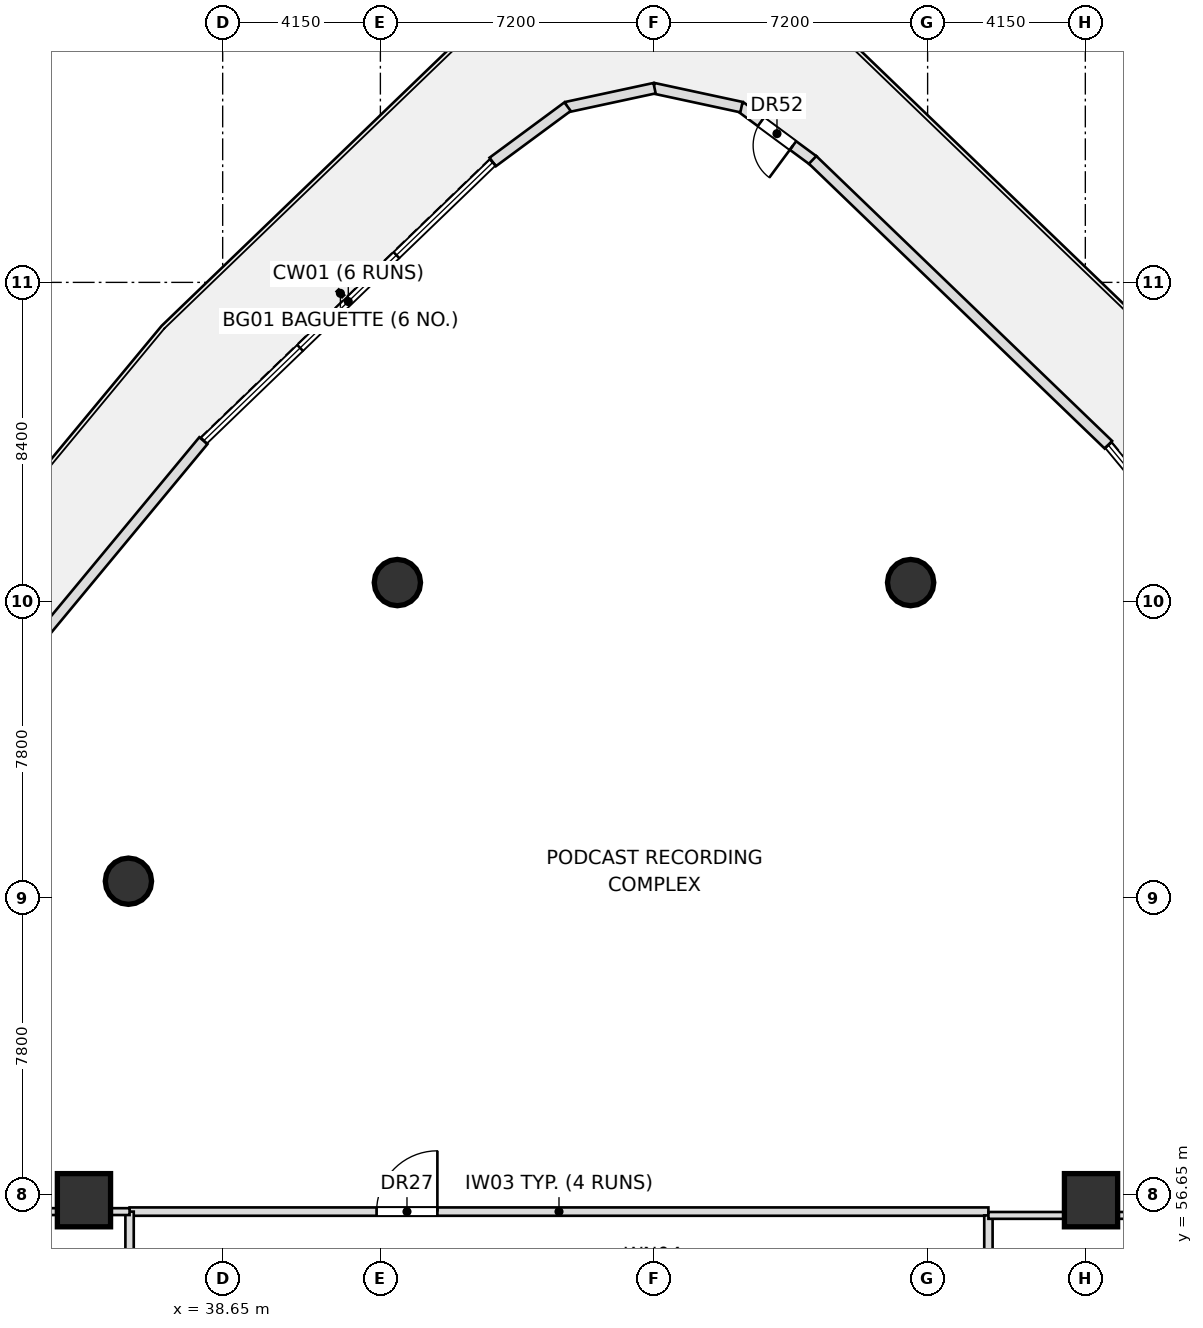
"""IFC4 building model, lengths in metres.
Left out: names, types, materials, properties, quantities, classifications, styles, units other than length and angle.
Written with IfcOpenShell. Run it as: python <this file> out.ifc"""

import sys

from ifc_helpers import new_model, si_unit, direction, frame, frame_2d, origin, origin_2d, place, context, subcontext, project, spatial, rectangle, hollow_circle, extrude, element, fill, save


model = new_model("IFC4")
c1 = context("Model", 3, precision=1e-05, world=origin(), true_north=direction((0.0, 1.0)))
c2 = subcontext(c1, "Body", "Model", "MODEL_VIEW")
j1 = project(units=[si_unit("LENGTHUNIT", "METRE"), si_unit("PLANEANGLEUNIT", "RADIAN")], contexts=[c1])
p1 = place(None, origin())
s1 = spatial("IfcSite", under=j1, at=p1, CompositionType="ELEMENT")
p2 = place(p1, origin())
s2 = spatial("IfcBuilding", under=s1, at=p2, CompositionType="ELEMENT")
p3 = place(p2, frame((0.0, 0.0, 11.4)))
s3 = spatial("IfcBuildingStorey", under=s2, at=p3, CompositionType="ELEMENT", Elevation=11.4)
for number, where, z_axis, x_axis in (
    (1, (61.5, 56.5, 0.0), (0.0, 0.0, 1.0), (1.0, 0.0, 0.0)),
    (2, (35.0, 56.5, 0.0), (0.0, 0.0, 1.0), (1.0, 0.0, 0.0)),
):
    element("IfcColumn", number, at=place(p3, frame(where, z_axis=z_axis, x_axis=x_axis)), inside=s3, PredefinedType="COLUMN", context=c2, shape_type="SweptSolid", body=[
        extrude(rectangle(XDim=1.4, YDim=1.4, at=origin_2d()), origin(), (0.0, 0.0, 1.0), 5.05),
    ])
for number, where, z_axis, x_axis in (
    (3, (43.247, 72.751, 0.0), (0.0, 0.0, 1.0), (1.0, 0.0, 0.0)),
    (4, (36.17, 64.893, 0.0), (0.0, 0.0, 1.0), (1.0, 0.0, 0.0)),
    (5, (56.753, 72.751, 0.0), (0.0, 0.0, 1.0), (1.0, 0.0, 0.0)),
):
    element("IfcColumn", number, at=place(p3, frame(where, z_axis=z_axis, x_axis=x_axis)), inside=s3, PredefinedType="COLUMN", context=c2, shape_type="SweptSolid", body=[
        extrude(hollow_circle(Radius=0.61, WallThickness=0.05, at=origin_2d()), origin(), (0.0, 0.0, 1.0), 5.05),
    ])
p4 = place(p3, frame((36.2, 56.2, 0.0), z_axis=(0.0, 0.0, 1.0), x_axis=(1.0, 0.0, 0.0)))
e6 = element("IfcWall", 6, at=p4, inside=s3, PredefinedType="PARTITIONING", context=c2, shape_type="SweptSolid", body=[
    extrude(rectangle(XDim=22.6, YDim=0.22, at=frame_2d((11.3, 0.0))), origin(), (0.0, 0.0, 1.0), 5.05),
])
p5 = place(p4, frame((6.5, 0.0, 0.0)))
e7 = element("IfcOpeningElement", 7, at=p5, cuts=e6, PredefinedType="OPENING", context=c2, shape_type="SweptSolid", body=[
    extrude(rectangle(XDim=1.6, YDim=2.3, at=frame_2d((0.8, 1.15))), frame((0.0, 0.12, 0.0), z_axis=(0.0, -1.0, 0.0), x_axis=(1.0, 0.0, 0.0)), (0.0, 0.0, 1.0), 0.24),
])
p6 = place(p3, frame((36.2, 38.1, 0.0), z_axis=(0.0, 0.0, 1.0), x_axis=(0.0, 1.0, 0.0)))
e8 = element("IfcWall", 8, at=p6, inside=s3, PredefinedType="PARTITIONING", context=c2, shape_type="SweptSolid", body=[
    extrude(rectangle(XDim=18.1, YDim=0.22, at=frame_2d((9.05, 0.0))), origin(), (0.0, 0.0, 1.0), 4.125),
])
p7 = place(p6, frame((5.5, 0.0, 0.0)))
e9 = element("IfcOpeningElement", 9, at=p7, cuts=e8, PredefinedType="OPENING", context=c2, shape_type="SweptSolid", body=[
    extrude(rectangle(XDim=1.6, YDim=2.3, at=frame_2d((0.8, 1.15))), frame((0.0, 0.12, 0.0), z_axis=(0.0, -1.0, 0.0), x_axis=(1.0, 0.0, 0.0)), (0.0, 0.0, 1.0), 0.24),
])
p8 = place(p3, frame((23.912, 56.2, 0.0), z_axis=(0.0, 0.0, 1.0), x_axis=(1.0, 0.0, 0.0)))
e10 = element("IfcWall", 10, at=p8, inside=s3, PredefinedType="PARTITIONING", context=c2, shape_type="SweptSolid", body=[
    extrude(rectangle(XDim=12.288, YDim=0.18, at=frame_2d((6.144, 0.0))), origin(), (0.0, 0.0, 1.0), 4.225),
])
p9 = place(p3, frame((58.8, 44.55, 0.0), z_axis=(0.0, 0.0, 1.0), x_axis=(0.0, 1.0, 0.0)))
e11 = element("IfcWall", 11, at=p9, inside=s3, PredefinedType="PARTITIONING", context=c2, shape_type="SweptSolid", body=[
    extrude(rectangle(XDim=11.55, YDim=0.22, at=frame_2d((5.775, 0.0))), origin(), (0.0, 0.0, 1.0), 4.125),
])
p10 = place(p9, frame((5.2, 0.0, 0.0)))
e12 = element("IfcOpeningElement", 12, at=p10, cuts=e11, PredefinedType="OPENING", context=c2, shape_type="SweptSolid", body=[
    extrude(rectangle(XDim=1.6, YDim=2.3, at=frame_2d((0.8, 1.15))), frame((0.0, 0.12, 0.0), z_axis=(0.0, -1.0, 0.0), x_axis=(1.0, 0.0, 0.0)), (0.0, 0.0, 1.0), 0.24),
])
p11 = place(p3, frame((58.8, 56.1, 0.0), z_axis=(0.0, 0.0, 1.0), x_axis=(1.0, 0.0, 0.0)))
e13 = element("IfcWall", 13, at=p11, inside=s3, PredefinedType="PARTITIONING", context=c2, shape_type="SweptSolid", body=[
    extrude(rectangle(XDim=17.339, YDim=0.18, at=frame_2d((8.669, 0.0))), origin(), (0.0, 0.0, 1.0), 4.225),
])
p12 = place(p3, frame((54.197, 83.854, 0.0), z_axis=(0.0, 0.0, 1.0), x_axis=(-0.804367171919, 0.594132521194, 0.0)))
e14 = element("IfcWall", 14, at=p12, inside=s3, PredefinedType="STANDARD", context=c2, shape_type="SweptSolid", body=[
    extrude(rectangle(XDim=2.39, YDim=0.28, at=frame_2d((1.195, 0.0))), origin(), (0.0, 0.0, 1.0), 5.05),
])
p13 = place(p12, frame((0.67, 0.0, 0.0)))
e15 = element("IfcOpeningElement", 15, at=p13, cuts=e14, PredefinedType="OPENING", context=c2, shape_type="SweptSolid", body=[
    extrude(rectangle(XDim=1.05, YDim=2.2, at=frame_2d((0.525, 1.1))), frame((0.0, 0.15, 0.0), z_axis=(0.0, -1.0, 0.0), x_axis=(1.0, 0.0, 0.0)), (0.0, 0.0, 1.0), 0.3),
])
for number, where, z_axis, x_axis in (
    (16, (52.301, 85.261, 0.0), (0.0, 0.0, 1.0), (-0.978, 0.211, 0.0)),
    (17, (50.015, 85.76, 0.0), (0.0, 0.0, 1.0), (-0.978, -0.211, 0.0)),
):
    element("IfcWall", number, at=place(p3, frame(where, z_axis=z_axis, x_axis=x_axis)), inside=s3, PredefinedType="STANDARD", context=c2, shape_type="SweptSolid", body=[
        extrude(rectangle(XDim=2.369, YDim=0.28, at=frame_2d((1.185, 0.0))), origin(), (0.0, 0.0, 1.0), 5.05),
    ])
p14 = place(p3, frame((47.725, 85.273, 0.0), z_axis=(0.0, 0.0, 1.0), x_axis=(-0.804368769198, -0.594130358709, 0.0)))
e18 = element("IfcWall", 18, at=p14, inside=s3, PredefinedType="STANDARD", context=c2, shape_type="SweptSolid", body=[
    extrude(rectangle(XDim=2.449, YDim=0.28, at=frame_2d((1.225, 0.0))), origin(), (0.0, 0.0, 1.0), 5.05),
])
p15 = place(p3, frame((38.143, 76.486, 0.0), z_axis=(0.0, 0.0, 1.0), x_axis=(-0.638079864094, -0.769970185811, 0.0)))
e19 = element("IfcWall", 19, at=p15, inside=s3, PredefinedType="STANDARD", context=c2, shape_type="SweptSolid", body=[
    extrude(rectangle(XDim=10.807, YDim=0.28, at=frame_2d((5.403, 0.0))), origin(), (0.0, 0.0, 1.0), 5.05),
])
p16 = place(p3, frame((61.957, 76.378, 0.0), z_axis=(0.0, 0.0, 1.0), x_axis=(-0.720300979456, 0.693661660318, 0.0)))
e20 = element("IfcWall", 20, at=p16, inside=s3, PredefinedType="STANDARD", context=c2, shape_type="SweptSolid", body=[
    extrude(rectangle(XDim=10.805, YDim=0.28, at=frame_2d((5.403, 0.0))), origin(), (0.0, 0.0, 1.0), 5.05),
])
p17 = place(p5, origin())
e21 = element("IfcDoor", 21, at=p17, inside=s3, OperationType="SINGLE_SWING_RIGHT", PredefinedType="DOOR", context=c2, shape_type="SweptSolid", body=[
    extrude(rectangle(XDim=1.6, YDim=2.3, at=frame_2d((0.8, 1.15))), frame((0.0, 0.025, 0.0), z_axis=(0.0, -1.0, 0.0), x_axis=(1.0, 0.0, 0.0)), (0.0, 0.0, 1.0), 0.05),
])
fill(e7, e21)
p18 = place(p13, origin())
e22 = element("IfcDoor", 22, at=p18, inside=s3, OperationType="SINGLE_SWING_LEFT", PredefinedType="DOOR", context=c2, shape_type="SweptSolid", body=[
    extrude(rectangle(XDim=1.05, YDim=2.2, at=frame_2d((0.525, 1.1))), frame((0.0, 0.025, 0.0), z_axis=(0.0, -1.0, 0.0), x_axis=(1.0, 0.0, 0.0)), (0.0, 0.0, 1.0), 0.05),
])
fill(e15, e22)
save(model, sys.argv[1])
